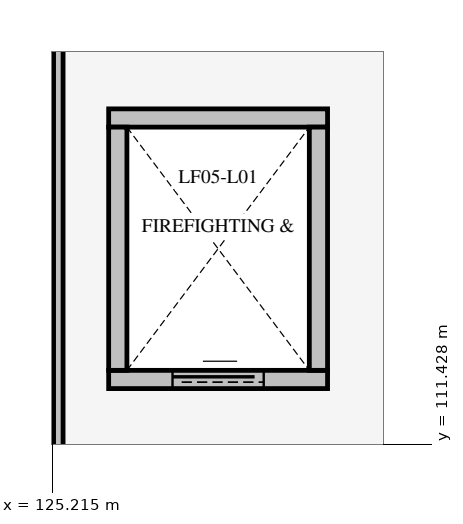
"""IFC4 building model, lengths in metres.
Left out: names, types, materials, properties, quantities, classifications, styles, units other than length and angle.
Written with IfcOpenShell. Run it as: python <this file> out.ifc"""

import sys

from ifc_helpers import new_model, si_unit, direction, frame, frame_2d, origin, place, context, subcontext, project, spatial, rectangle, extrude, element, fill, save


model = new_model("IFC4")
c1 = context("Model", 3, precision=1e-05, world=origin(), true_north=direction((0.0, 1.0)))
c2 = subcontext(c1, "Body", "Model", "MODEL_VIEW")
j1 = project(units=[si_unit("LENGTHUNIT", "METRE"), si_unit("PLANEANGLEUNIT", "RADIAN")], contexts=[c1])
p1 = place(None, origin())
s1 = spatial("IfcSite", under=j1, at=p1, CompositionType="ELEMENT")
p2 = place(p1, origin())
s2 = spatial("IfcBuilding", under=s1, at=p2, CompositionType="ELEMENT")
p3 = place(p2, frame((0.0, 0.0, 5.4)))
s3 = spatial("IfcBuildingStorey", under=s2, at=p3, CompositionType="ELEMENT", Elevation=5.4)
p4 = place(p3, frame((125.96, 112.28, 0.0), z_axis=(0.0, 0.0, 1.0), x_axis=(1.0, 0.0, 0.0)))
e1 = element("IfcWall", 1, at=p4, inside=s3, PredefinedType="SOLIDWALL", context=c2, shape_type="SweptSolid", body=[
    extrude(rectangle(XDim=2.88, YDim=0.24, at=frame_2d((1.44, 0.0))), origin(), (0.0, 0.0, 1.0), 4.8),
])
p5 = place(p4, frame((0.84, 0.0, 0.0)))
e2 = element("IfcOpeningElement", 2, at=p5, cuts=e1, PredefinedType="OPENING", context=c2, shape_type="SweptSolid", body=[
    extrude(rectangle(XDim=1.2, YDim=2.2, at=frame_2d((0.6, 1.1))), frame((0.0, 0.132, 0.0), z_axis=(0.0, -1.0, 0.0), x_axis=(1.0, 0.0, 0.0)), (0.0, 0.0, 1.0), 0.264),
])
p6 = place(p3, frame((125.96, 115.72, 0.0), z_axis=(0.0, 0.0, 1.0), x_axis=(1.0, 0.0, 0.0)))
e3 = element("IfcWall", 3, at=p6, inside=s3, PredefinedType="SOLIDWALL", context=c2, shape_type="SweptSolid", body=[
    extrude(rectangle(XDim=2.88, YDim=0.24, at=frame_2d((1.44, 0.0))), origin(), (0.0, 0.0, 1.0), 4.8),
])
for number, where, z_axis, x_axis in (
    (4, (126.08, 112.4, 0.0), (0.0, 0.0, 1.0), (0.0, 1.0, 0.0)),
    (5, (128.72, 112.4, 0.0), (0.0, 0.0, 1.0), (0.0, 1.0, 0.0)),
):
    element("IfcWall", number, at=place(p3, frame(where, z_axis=z_axis, x_axis=x_axis)), inside=s3, PredefinedType="SOLIDWALL", context=c2, shape_type="SweptSolid", body=[
        extrude(rectangle(XDim=3.2, YDim=0.24, at=frame_2d((1.6, 0.0))), origin(), (0.0, 0.0, 1.0), 4.8),
    ])
p7 = place(p3, frame((125.298, 106.925, 0.0), z_axis=(0.0, 0.0, 1.0), x_axis=(0.0, 1.0, 0.0)))
e6 = element("IfcWall", 6, at=p7, inside=s3, PredefinedType="PARTITIONING", context=c2, shape_type="SweptSolid", body=[
    extrude(rectangle(XDim=10.15, YDim=0.125, at=frame_2d((5.075, 0.0))), origin(), (0.0, 0.0, 1.0), 4.545),
])
p8 = place(p5, origin())
e7 = element("IfcDoor", 7, at=p8, inside=s3, OperationType="SLIDING_TO_RIGHT", PredefinedType="USERDEFINED", context=c2, shape_type="SweptSolid", body=[
    extrude(rectangle(XDim=1.2, YDim=2.2, at=frame_2d((0.6, 1.1))), frame((0.0, 0.025, 0.0), z_axis=(0.0, -1.0, 0.0), x_axis=(1.0, 0.0, 0.0)), (0.0, 0.0, 1.0), 0.05),
])
fill(e2, e7)
save(model, sys.argv[1])
